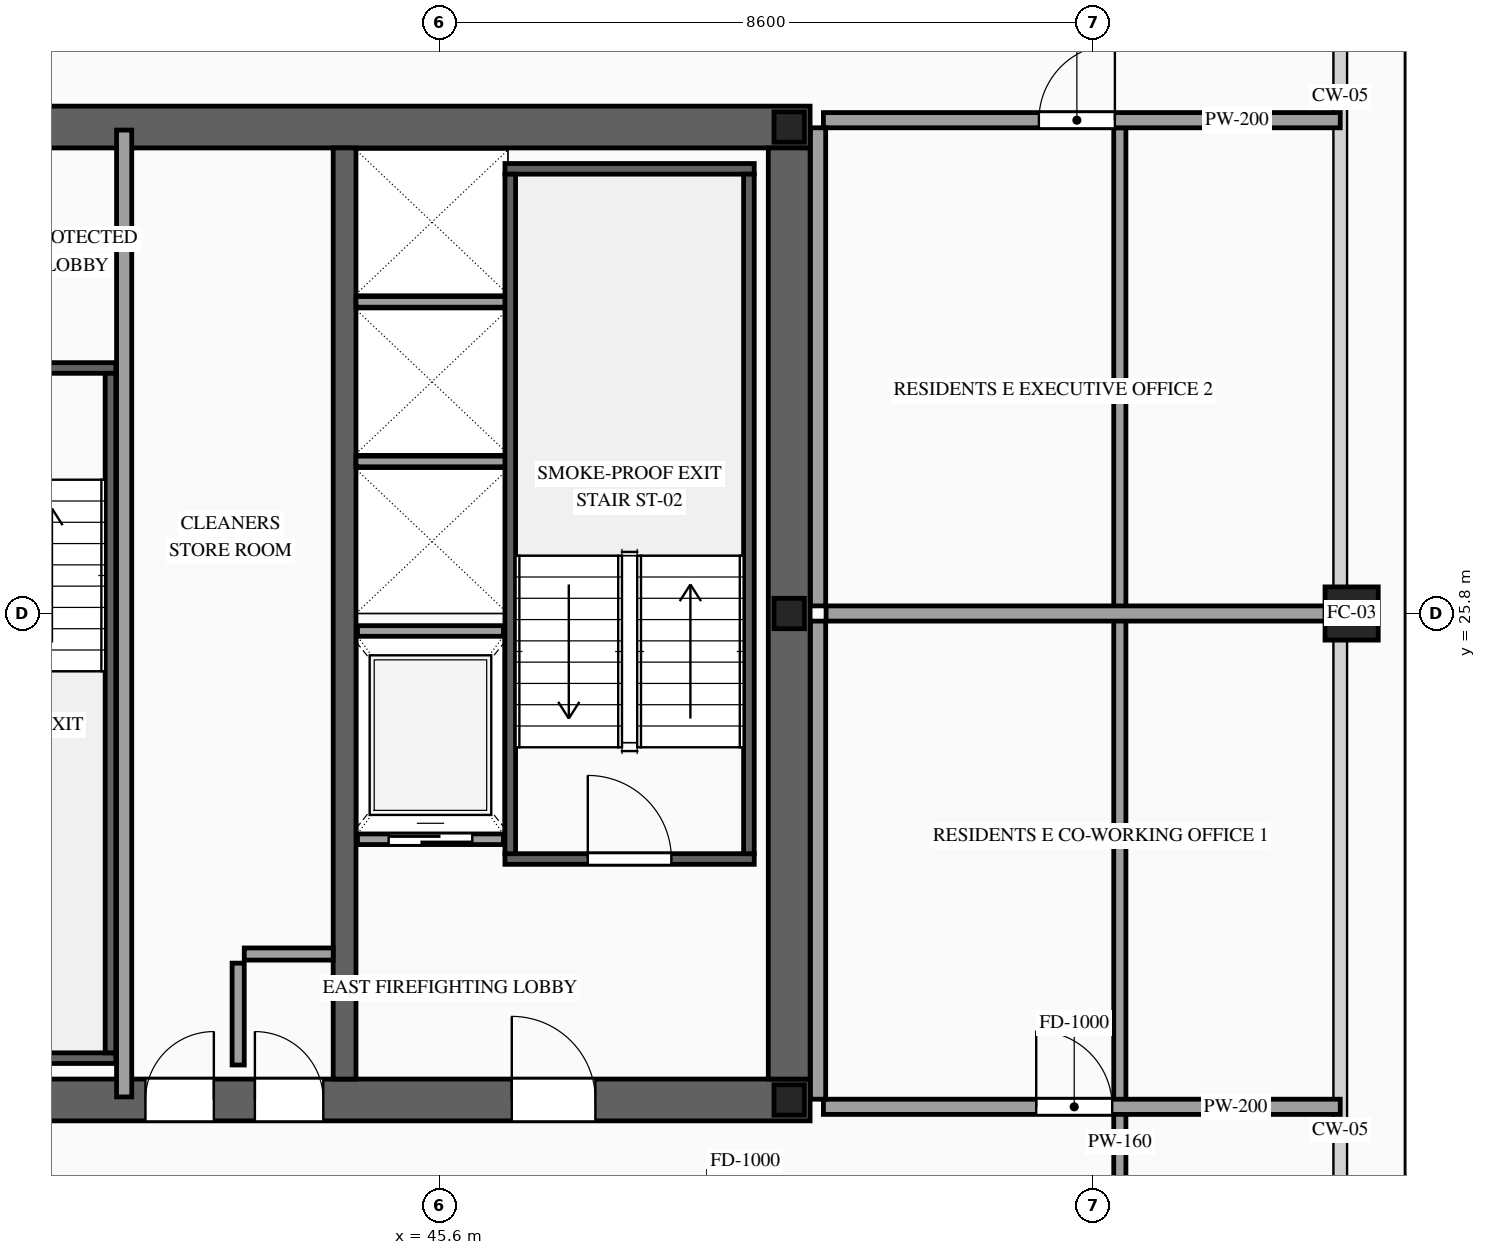
"""IFC4 building model, lengths in metres.
Left out: names, types, materials, properties, quantities, classifications, styles, units other than length and angle.
Written with IfcOpenShell. Run it as: python <this file> out.ifc"""

import sys

from ifc_helpers import new_model, si_unit, direction, frame, frame_2d, origin, origin_2d, place, context, subcontext, project, spatial, rectangle, hollow_rectangle, i_section, extrude, source, transform, mapped, element, fill, save


model = new_model("IFC4")
c1 = context("Model", 3, precision=1e-05, world=origin(), true_north=direction((0.0, 1.0)))
c2 = subcontext(c1, "Body", "Model", "MODEL_VIEW")
j1 = project(units=[si_unit("LENGTHUNIT", "METRE"), si_unit("PLANEANGLEUNIT", "RADIAN")], contexts=[c1])
p1 = place(None, origin())
s1 = spatial("IfcSite", under=j1, at=p1, CompositionType="ELEMENT")
p2 = place(p1, origin())
s2 = spatial("IfcBuilding", under=s1, at=p2, CompositionType="ELEMENT")
p3 = place(p2, frame((0.0, 0.0, 252.1)))
s3 = spatial("IfcBuildingStorey", under=s2, at=p3, CompositionType="ELEMENT", Elevation=252.1)
p4 = place(p3, frame((23.525, 19.4, 0.0), z_axis=(0.0, 0.0, 1.0), x_axis=(1.0, 0.0, 0.0)))
e1 = element("IfcWall", 1, at=p4, inside=s3, PredefinedType="SHEAR", context=c2, shape_type="SweptSolid", body=[
    extrude(rectangle(XDim=26.95, YDim=0.55, at=frame_2d((13.475, 0.0))), origin(), (0.0, 0.0, 1.0), 3.5),
])
p5 = place(p4, frame((1.925, 0.0, 0.0)))
e2 = element("IfcOpeningElement", 2, at=p5, cuts=e1, PredefinedType="OPENING", context=c2, shape_type="SweptSolid", body=[
    extrude(rectangle(XDim=1.1, YDim=2.2, at=frame_2d((0.55, 1.1))), frame((0.0, 0.29, 0.0), z_axis=(0.0, -1.0, 0.0), x_axis=(1.0, 0.0, 0.0)), (0.0, 0.0, 1.0), 0.58),
])
p6 = place(p4, frame((9.825, 0.0, 0.0)))
e3 = element("IfcOpeningElement", 3, at=p6, cuts=e1, PredefinedType="OPENING", context=c2, shape_type="SweptSolid", body=[
    extrude(rectangle(XDim=1.1, YDim=2.2, at=frame_2d((0.55, 1.1))), frame((0.0, 0.29, 0.0), z_axis=(0.0, -1.0, 0.0), x_axis=(1.0, 0.0, 0.0)), (0.0, 0.0, 1.0), 0.58),
])
p7 = place(p4, frame((23.025, 0.0, 0.0)))
e4 = element("IfcOpeningElement", 4, at=p7, cuts=e1, PredefinedType="OPENING", context=c2, shape_type="SweptSolid", body=[
    extrude(rectangle(XDim=1.1, YDim=2.2, at=frame_2d((0.55, 1.1))), frame((0.0, 0.29, 0.0), z_axis=(0.0, -1.0, 0.0), x_axis=(1.0, 0.0, 0.0)), (0.0, 0.0, 1.0), 0.58),
])
p8 = place(p4, frame((19.645, 0.0, 0.0)))
e5 = element("IfcOpeningElement", 5, at=p8, cuts=e1, PredefinedType="OPENING", context=c2, shape_type="SweptSolid", body=[
    extrude(rectangle(XDim=0.9, YDim=2.15, at=frame_2d((0.45, 1.075))), frame((0.0, 0.29, 0.0), z_axis=(0.0, -1.0, 0.0), x_axis=(1.0, 0.0, 0.0)), (0.0, 0.0, 1.0), 0.58),
])
p9 = place(p4, frame((18.205, 0.0, 0.0)))
e6 = element("IfcOpeningElement", 6, at=p9, cuts=e1, PredefinedType="OPENING", context=c2, shape_type="SweptSolid", body=[
    extrude(rectangle(XDim=0.9, YDim=2.15, at=frame_2d((0.45, 1.075))), frame((0.0, 0.29, 0.0), z_axis=(0.0, -1.0, 0.0), x_axis=(1.0, 0.0, 0.0)), (0.0, 0.0, 1.0), 0.58),
])
p10 = place(p3, frame((23.525, 32.2, 0.0), z_axis=(0.0, 0.0, 1.0), x_axis=(1.0, 0.0, 0.0)))
e7 = element("IfcWall", 7, at=p10, inside=s3, PredefinedType="SHEAR", context=c2, shape_type="SweptSolid", body=[
    extrude(rectangle(XDim=26.95, YDim=0.55, at=frame_2d((13.475, 0.0))), origin(), (0.0, 0.0, 1.0), 3.5),
])
p11 = place(p10, frame((4.545, 0.0, 0.0)))
e8 = element("IfcOpeningElement", 8, at=p11, cuts=e7, PredefinedType="OPENING", context=c2, shape_type="SweptSolid", body=[
    extrude(rectangle(XDim=0.9, YDim=2.15, at=frame_2d((0.45, 1.075))), frame((0.0, 0.29, 0.0), z_axis=(0.0, -1.0, 0.0), x_axis=(1.0, 0.0, 0.0)), (0.0, 0.0, 1.0), 0.58),
])
p12 = place(p10, frame((9.825, 0.0, 0.0)))
e9 = element("IfcOpeningElement", 9, at=p12, cuts=e7, PredefinedType="OPENING", context=c2, shape_type="SweptSolid", body=[
    extrude(rectangle(XDim=1.1, YDim=2.2, at=frame_2d((0.55, 1.1))), frame((0.0, 0.29, 0.0), z_axis=(0.0, -1.0, 0.0), x_axis=(1.0, 0.0, 0.0)), (0.0, 0.0, 1.0), 0.58),
])
p13 = place(p10, frame((15.675, 0.0, 0.0)))
e10 = element("IfcOpeningElement", 10, at=p13, cuts=e7, PredefinedType="OPENING", context=c2, shape_type="SweptSolid", body=[
    extrude(rectangle(XDim=1.1, YDim=2.2, at=frame_2d((0.55, 1.1))), frame((0.0, 0.29, 0.0), z_axis=(0.0, -1.0, 0.0), x_axis=(1.0, 0.0, 0.0)), (0.0, 0.0, 1.0), 0.58),
])
m1 = source(origin(), c2, "Body", "SweptSolid", [
    extrude(rectangle(XDim=12.25, YDim=0.55, at=frame_2d((6.125, 0.0))), origin(), (0.0, 0.0, 1.0), 3.5),
])
p14 = place(p3, frame((50.2, 19.675, 0.0), z_axis=(0.0, 0.0, 1.0), x_axis=(0.0, 1.0, 0.0)))
e11 = element("IfcWall", 11, at=p14, inside=s3, PredefinedType="SHEAR", context=c2, shape_type="MappedRepresentation", body=[
    mapped(m1, transform((0.0, 0.0, 0.0), scale=1.0)),
])
m2 = source(origin(), c2, "Body", "SweptSolid", [
    extrude(rectangle(XDim=12.25, YDim=0.3, at=frame_2d((6.125, 0.0))), origin(), (0.0, 0.0, 1.0), 3.5),
])
p15 = place(p3, frame((44.35, 19.675, 0.0), z_axis=(0.0, 0.0, 1.0), x_axis=(0.0, 1.0, 0.0)))
e12 = element("IfcWall", 12, at=p15, inside=s3, PredefinedType="SOLIDWALL", context=c2, shape_type="MappedRepresentation", body=[
    mapped(m2, transform((0.0, 0.0, 0.0), scale=1.0)),
])
m3 = source(origin(), c2, "Body", "SweptSolid", [
    extrude(i_section(OverallWidth=0.4, OverallDepth=0.4, WebThickness=0.013, FlangeThickness=0.021, at=origin_2d()), origin(), (0.0, 0.0, 1.0), 3.5),
])
for number, where, z_axis, x_axis in (
    (13, (50.2, 19.4, 0.0), (0.0, 0.0, 1.0), (1.0, 0.0, 0.0)),
    (14, (50.2, 25.8, 0.0), (0.0, 0.0, 1.0), (1.0, 0.0, 0.0)),
    (15, (50.2, 32.2, 0.0), (0.0, 0.0, 1.0), (1.0, 0.0, 0.0)),
):
    element("IfcColumn", number, at=place(p3, frame(where, z_axis=z_axis, x_axis=x_axis)), inside=s3, PredefinedType="COLUMN", context=c2, shape_type="MappedRepresentation", body=[
        mapped(m3, transform((0.0, 0.0, 0.0), scale=1.0)),
    ])
m4 = source(origin(), c2, "Body", "SweptSolid", [
    extrude(hollow_rectangle(XDim=0.7, YDim=0.7, WallThickness=0.032, at=origin_2d()), origin(), (0.0, 0.0, 1.0), 3.5),
])
p16 = place(p3, frame((57.6, 25.8, 0.0), z_axis=(0.0, 0.0, 1.0), x_axis=(1.0, 0.0, 0.0)))
e16 = element("IfcColumn", 16, at=p16, inside=s3, PredefinedType="COLUMN", context=c2, shape_type="MappedRepresentation", body=[
    mapped(m4, transform((0.0, 0.0, 0.0), scale=1.0)),
])
p17 = place(p3, frame((44.52, 22.83, 0.0), z_axis=(0.0, 0.0, 1.0), x_axis=(1.0, 0.0, 0.0)))
e17 = element("IfcWall", 17, at=p17, inside=s3, PredefinedType="SOLIDWALL", context=c2, shape_type="SweptSolid", body=[
    extrude(rectangle(XDim=1.92, YDim=0.14, at=frame_2d((0.96, 0.0))), origin(), (0.0, 0.0, 1.0), 3.28),
])
p18 = place(p17, frame((0.41, 0.0, 0.0)))
e18 = element("IfcOpeningElement", 18, at=p18, cuts=e17, PredefinedType="OPENING", context=c2, shape_type="SweptSolid", body=[
    extrude(rectangle(XDim=1.1, YDim=2.2, at=frame_2d((0.55, 1.1))), frame((0.0, 0.085, 0.0), z_axis=(0.0, -1.0, 0.0), x_axis=(1.0, 0.0, 0.0)), (0.0, 0.0, 1.0), 0.17),
])
m5 = source(origin(), c2, "Body", "SweptSolid", [
    extrude(rectangle(XDim=1.92, YDim=0.14, at=frame_2d((0.96, 0.0))), origin(), (0.0, 0.0, 1.0), 3.28),
])
p19 = place(p3, frame((44.52, 25.57, 0.0), z_axis=(0.0, 0.0, 1.0), x_axis=(1.0, 0.0, 0.0)))
e19 = element("IfcWall", 19, at=p19, inside=s3, PredefinedType="SOLIDWALL", context=c2, shape_type="MappedRepresentation", body=[
    mapped(m5, transform((0.0, 0.0, 0.0), scale=1.0)),
])
m6 = source(origin(), c2, "Body", "SweptSolid", [
    extrude(rectangle(XDim=2.0, YDim=0.14, at=frame_2d((1.0, 0.0))), origin(), (0.0, 0.0, 1.0), 3.28),
])
for number, where, z_axis, x_axis in (
    (20, (44.5, 27.8, 0.0), (0.0, 0.0, 1.0), (1.0, 0.0, 0.0)),
    (21, (44.5, 29.9, 0.0), (0.0, 0.0, 1.0), (1.0, 0.0, 0.0)),
):
    element("IfcWall", number, at=place(p3, frame(where, z_axis=z_axis, x_axis=x_axis)), inside=s3, PredefinedType="SOLIDWALL", context=c2, shape_type="MappedRepresentation", body=[
        mapped(m6, transform((0.0, 0.0, 0.0), scale=1.0)),
    ])
p20 = place(p3, frame((46.46, 22.57, 0.0), z_axis=(0.0, 0.0, 1.0), x_axis=(1.0, 0.0, 0.0)))
e22 = element("IfcWall", 22, at=p20, inside=s3, PredefinedType="SOLIDWALL", context=c2, shape_type="SweptSolid", body=[
    extrude(rectangle(XDim=3.28, YDim=0.14, at=frame_2d((1.64, 0.0))), origin(), (0.0, 0.0, 1.0), 3.28),
])
p21 = place(p20, frame((1.09, 0.0, 0.0)))
e23 = element("IfcOpeningElement", 23, at=p21, cuts=e22, PredefinedType="OPENING", context=c2, shape_type="SweptSolid", body=[
    extrude(rectangle(XDim=1.1, YDim=2.2, at=frame_2d((0.55, 1.1))), frame((0.0, 0.085, 0.0), z_axis=(0.0, -1.0, 0.0), x_axis=(1.0, 0.0, 0.0)), (0.0, 0.0, 1.0), 0.17),
])
m7 = source(origin(), c2, "Body", "SweptSolid", [
    extrude(rectangle(XDim=3.28, YDim=0.14, at=frame_2d((1.64, 0.0))), origin(), (0.0, 0.0, 1.0), 3.28),
])
p22 = place(p3, frame((46.46, 31.65, 0.0), z_axis=(0.0, 0.0, 1.0), x_axis=(1.0, 0.0, 0.0)))
e24 = element("IfcWall", 24, at=p22, inside=s3, PredefinedType="SOLIDWALL", context=c2, shape_type="MappedRepresentation", body=[
    mapped(m7, transform((0.0, 0.0, 0.0), scale=1.0)),
])
m8 = source(origin(), c2, "Body", "SweptSolid", [
    extrude(rectangle(XDim=8.94, YDim=0.14, at=frame_2d((4.47, 0.0))), origin(), (0.0, 0.0, 1.0), 3.28),
])
for number, where, z_axis, x_axis in (
    (25, (46.53, 22.64, 0.0), (0.0, 0.0, 1.0), (0.0, 1.0, 0.0)),
    (26, (49.67, 22.64, 0.0), (0.0, 0.0, 1.0), (0.0, 1.0, 0.0)),
):
    element("IfcWall", number, at=place(p3, frame(where, z_axis=z_axis, x_axis=x_axis)), inside=s3, PredefinedType="SOLIDWALL", context=c2, shape_type="MappedRepresentation", body=[
        mapped(m8, transform((0.0, 0.0, 0.0), scale=1.0)),
    ])
p23 = place(p3, frame((38.2, 29.03, 0.0), z_axis=(0.0, 0.0, 1.0), x_axis=(1.0, 0.0, 0.0)))
e27 = element("IfcWall", 27, at=p23, inside=s3, PredefinedType="SOLIDWALL", context=c2, shape_type="SweptSolid", body=[
    extrude(rectangle(XDim=3.14, YDim=0.14, at=frame_2d((1.57, 0.0))), origin(), (0.0, 0.0, 1.0), 3.28),
])
p24 = place(p23, frame((1.02, 0.0, 0.0)))
e28 = element("IfcOpeningElement", 28, at=p24, cuts=e27, PredefinedType="OPENING", context=c2, shape_type="SweptSolid", body=[
    extrude(rectangle(XDim=1.1, YDim=2.2, at=frame_2d((0.55, 1.1))), frame((0.0, 0.085, 0.0), z_axis=(0.0, -1.0, 0.0), x_axis=(1.0, 0.0, 0.0)), (0.0, 0.0, 1.0), 0.17),
])
m9 = source(origin(), c2, "Body", "SweptSolid", [
    extrude(rectangle(XDim=3.14, YDim=0.14, at=frame_2d((1.57, 0.0))), origin(), (0.0, 0.0, 1.0), 3.28),
])
p25 = place(p3, frame((38.2, 19.95, 0.0), z_axis=(0.0, 0.0, 1.0), x_axis=(1.0, 0.0, 0.0)))
e29 = element("IfcWall", 29, at=p25, inside=s3, PredefinedType="SOLIDWALL", context=c2, shape_type="MappedRepresentation", body=[
    mapped(m9, transform((0.0, 0.0, 0.0), scale=1.0)),
])
m10 = source(origin(), c2, "Body", "SweptSolid", [
    extrude(rectangle(XDim=8.94, YDim=0.14, at=frame_2d((4.47, 0.0))), origin(), (0.0, 0.0, 1.0), 3.28),
])
p26 = place(p3, frame((41.27, 20.02, 0.0), z_axis=(0.0, 0.0, 1.0), x_axis=(0.0, 1.0, 0.0)))
e30 = element("IfcWall", 30, at=p26, inside=s3, PredefinedType="SOLIDWALL", context=c2, shape_type="MappedRepresentation", body=[
    mapped(m10, transform((0.0, 0.0, 0.0), scale=1.0)),
])
m11 = source(origin(), c2, "Body", "SweptSolid", [
    extrude(rectangle(XDim=1.34, YDim=0.16, at=frame_2d((0.67, 0.0))), origin(), (0.0, 0.0, 1.0), 3.28),
])
p27 = place(p3, frame((42.95, 19.86, 0.0), z_axis=(0.0, 0.0, 1.0), x_axis=(0.0, 1.0, 0.0)))
e31 = element("IfcWall", 31, at=p27, inside=s3, PredefinedType="PARTITIONING", context=c2, shape_type="MappedRepresentation", body=[
    mapped(m11, transform((0.0, 0.0, 0.0), scale=1.0)),
])
m12 = source(origin(), c2, "Body", "SweptSolid", [
    extrude(rectangle(XDim=1.17, YDim=0.16, at=frame_2d((0.585, 0.0))), origin(), (0.0, 0.0, 1.0), 3.28),
])
p28 = place(p3, frame((43.03, 21.32, 0.0), z_axis=(0.0, 0.0, 1.0), x_axis=(1.0, 0.0, 0.0)))
e32 = element("IfcWall", 32, at=p28, inside=s3, PredefinedType="PARTITIONING", context=c2, shape_type="MappedRepresentation", body=[
    mapped(m12, transform((0.0, 0.0, 0.0), scale=1.0)),
])
m13 = source(origin(), c2, "Body", "SweptSolid", [
    extrude(rectangle(XDim=12.72, YDim=0.2, at=frame_2d((6.36, 0.0))), origin(), (0.0, 0.0, 1.0), 3.28),
])
p29 = place(p3, frame((41.45, 19.44, 0.0), z_axis=(0.0, 0.0, 1.0), x_axis=(0.0, 1.0, 0.0)))
e33 = element("IfcWall", 33, at=p29, inside=s3, PredefinedType="PARTITIONING", context=c2, shape_type="MappedRepresentation", body=[
    mapped(m13, transform((0.0, 0.0, 0.0), scale=1.0)),
])
m14 = source(origin(), c2, "Body", "SweptSolid", [
    extrude(rectangle(XDim=26.69, YDim=0.16, at=frame_2d((13.345, 0.0))), origin(), (0.0, 0.0, 1.0), 3.28),
])
p30 = place(p3, frame((54.55, 5.5, 0.0), z_axis=(0.0, 0.0, 1.0), x_axis=(0.0, 1.0, 0.0)))
e34 = element("IfcWall", 34, at=p30, inside=s3, PredefinedType="PARTITIONING", context=c2, shape_type="MappedRepresentation", body=[
    mapped(m14, transform((0.0, 0.0, 0.0), scale=1.0)),
])
p31 = place(p3, frame((50.65, 19.31, 0.0), z_axis=(0.0, 0.0, 1.0), x_axis=(1.0, 0.0, 0.0)))
e35 = element("IfcWall", 35, at=p31, inside=s3, PredefinedType="PARTITIONING", context=c2, shape_type="SweptSolid", body=[
    extrude(rectangle(XDim=6.8, YDim=0.2, at=frame_2d((3.4, 0.0))), origin(), (0.0, 0.0, 1.0), 2.825),
])
p32 = place(p31, frame((2.8, 0.0, 0.0)))
e36 = element("IfcOpeningElement", 36, at=p32, cuts=e35, PredefinedType="OPENING", context=c2, shape_type="SweptSolid", body=[
    extrude(rectangle(XDim=1.0, YDim=2.2, at=frame_2d((0.5, 1.1))), frame((0.0, 0.115, 0.0), z_axis=(0.0, -1.0, 0.0), x_axis=(1.0, 0.0, 0.0)), (0.0, 0.0, 1.0), 0.23),
])
m15 = source(origin(), c2, "Body", "SweptSolid", [
    extrude(rectangle(XDim=6.765, YDim=0.2, at=frame_2d((3.382, 0.0))), origin(), (0.0, 0.0, 1.0), 2.787),
])
p33 = place(p3, frame((50.685, 25.8, 0.0), z_axis=(0.0, 0.0, 1.0), x_axis=(1.0, 0.0, 0.0)))
e37 = element("IfcWall", 37, at=p33, inside=s3, PredefinedType="PARTITIONING", context=c2, shape_type="MappedRepresentation", body=[
    mapped(m15, transform((0.0, 0.0, 0.0), scale=1.0)),
])
m16 = source(origin(), c2, "Body", "SweptSolid", [
    extrude(rectangle(XDim=6.29, YDim=0.2, at=frame_2d((3.145, 0.0))), origin(), (0.0, 0.0, 1.0), 3.28),
])
p34 = place(p3, frame((50.58, 19.41, 0.0), z_axis=(0.0, 0.0, 1.0), x_axis=(0.0, 1.0, 0.0)))
e38 = element("IfcWall", 38, at=p34, inside=s3, PredefinedType="PARTITIONING", context=c2, shape_type="MappedRepresentation", body=[
    mapped(m16, transform((0.0, 0.0, 0.0), scale=1.0)),
])
p35 = place(p3, frame((50.65, 32.29, 0.0), z_axis=(0.0, 0.0, 1.0), x_axis=(1.0, 0.0, 0.0)))
e39 = element("IfcWall", 39, at=p35, inside=s3, PredefinedType="PARTITIONING", context=c2, shape_type="SweptSolid", body=[
    extrude(rectangle(XDim=6.8, YDim=0.2, at=frame_2d((3.4, 0.0))), origin(), (0.0, 0.0, 1.0), 2.825),
])
p36 = place(p35, frame((2.835, 0.0, 0.0)))
e40 = element("IfcOpeningElement", 40, at=p36, cuts=e39, PredefinedType="OPENING", context=c2, shape_type="SweptSolid", body=[
    extrude(rectangle(XDim=1.0, YDim=2.2, at=frame_2d((0.5, 1.1))), frame((0.0, 0.115, 0.0), z_axis=(0.0, -1.0, 0.0), x_axis=(1.0, 0.0, 0.0)), (0.0, 0.0, 1.0), 0.23),
])
p37 = place(p3, frame((50.58, 25.9, 0.0), z_axis=(0.0, 0.0, 1.0), x_axis=(0.0, 1.0, 0.0)))
e41 = element("IfcWall", 41, at=p37, inside=s3, PredefinedType="PARTITIONING", context=c2, shape_type="MappedRepresentation", body=[
    mapped(m16, transform((0.0, 0.0, 0.0), scale=1.0)),
])
m17 = source(origin(), c2, "Body", "SweptSolid", [
    extrude(rectangle(XDim=1.1, YDim=2.2, at=frame_2d((0.55, 1.1))), frame((0.0, 0.025, 0.0), z_axis=(0.0, -1.0, 0.0), x_axis=(1.0, 0.0, 0.0)), (0.0, 0.0, 1.0), 0.05),
])
p38 = place(p18, origin())
e42 = element("IfcDoor", 42, at=p38, inside=s3, OperationType="SLIDING_TO_RIGHT", PredefinedType="DOOR", context=c2, shape_type="MappedRepresentation", body=[
    mapped(m17, transform((0.0, 0.0, 0.0), scale=1.0)),
])
fill(e18, e42)
m18 = source(origin(), c2, "Body", "SweptSolid", [
    extrude(rectangle(XDim=1.1, YDim=2.2, at=frame_2d((0.55, 1.1))), frame((0.0, 0.025, 0.0), z_axis=(0.0, -1.0, 0.0), x_axis=(1.0, 0.0, 0.0)), (0.0, 0.0, 1.0), 0.05),
])
p39 = place(p21, origin())
e43 = element("IfcDoor", 43, at=p39, inside=s3, OperationType="SINGLE_SWING_LEFT", PredefinedType="DOOR", context=c2, shape_type="MappedRepresentation", body=[
    mapped(m18, transform((0.0, 0.0, 0.0), scale=1.0)),
])
fill(e23, e43)
p40 = place(p7, origin())
e44 = element("IfcDoor", 44, at=p40, inside=s3, OperationType="SINGLE_SWING_LEFT", PredefinedType="DOOR", context=c2, shape_type="MappedRepresentation", body=[
    mapped(m18, transform((0.0, 0.0, 0.0), scale=1.0)),
])
fill(e4, e44)
m19 = source(origin(), c2, "Body", "SweptSolid", [
    extrude(rectangle(XDim=0.9, YDim=2.15, at=frame_2d((0.45, 1.075))), frame((0.0, 0.025, 0.0), z_axis=(0.0, -1.0, 0.0), x_axis=(1.0, 0.0, 0.0)), (0.0, 0.0, 1.0), 0.05),
])
p41 = place(p8, origin())
e45 = element("IfcDoor", 45, at=p41, inside=s3, OperationType="SINGLE_SWING_LEFT", PredefinedType="DOOR", context=c2, shape_type="MappedRepresentation", body=[
    mapped(m19, transform((0.0, 0.0, 0.0), scale=1.0)),
])
fill(e5, e45)
p42 = place(p9, origin())
e46 = element("IfcDoor", 46, at=p42, inside=s3, OperationType="SINGLE_SWING_RIGHT", PredefinedType="DOOR", context=c2, shape_type="MappedRepresentation", body=[
    mapped(m19, transform((0.0, 0.0, 0.0), scale=1.0)),
])
fill(e6, e46)
m20 = source(origin(), c2, "Body", "SweptSolid", [
    extrude(rectangle(XDim=1.0, YDim=2.2, at=frame_2d((0.5, 1.1))), frame((0.0, 0.025, 0.0), z_axis=(0.0, -1.0, 0.0), x_axis=(1.0, 0.0, 0.0)), (0.0, 0.0, 1.0), 0.05),
])
p43 = place(p32, origin())
e47 = element("IfcDoor", 47, at=p43, inside=s3, OperationType="SINGLE_SWING_LEFT", PredefinedType="DOOR", context=c2, shape_type="MappedRepresentation", body=[
    mapped(m20, transform((0.0, 0.0, 0.0), scale=1.0)),
])
fill(e36, e47)
p44 = place(p36, origin())
e48 = element("IfcDoor", 48, at=p44, inside=s3, OperationType="SINGLE_SWING_RIGHT", PredefinedType="DOOR", context=c2, shape_type="MappedRepresentation", body=[
    mapped(m20, transform((0.0, 0.0, 0.0), scale=1.0)),
])
fill(e40, e48)
save(model, sys.argv[1])
